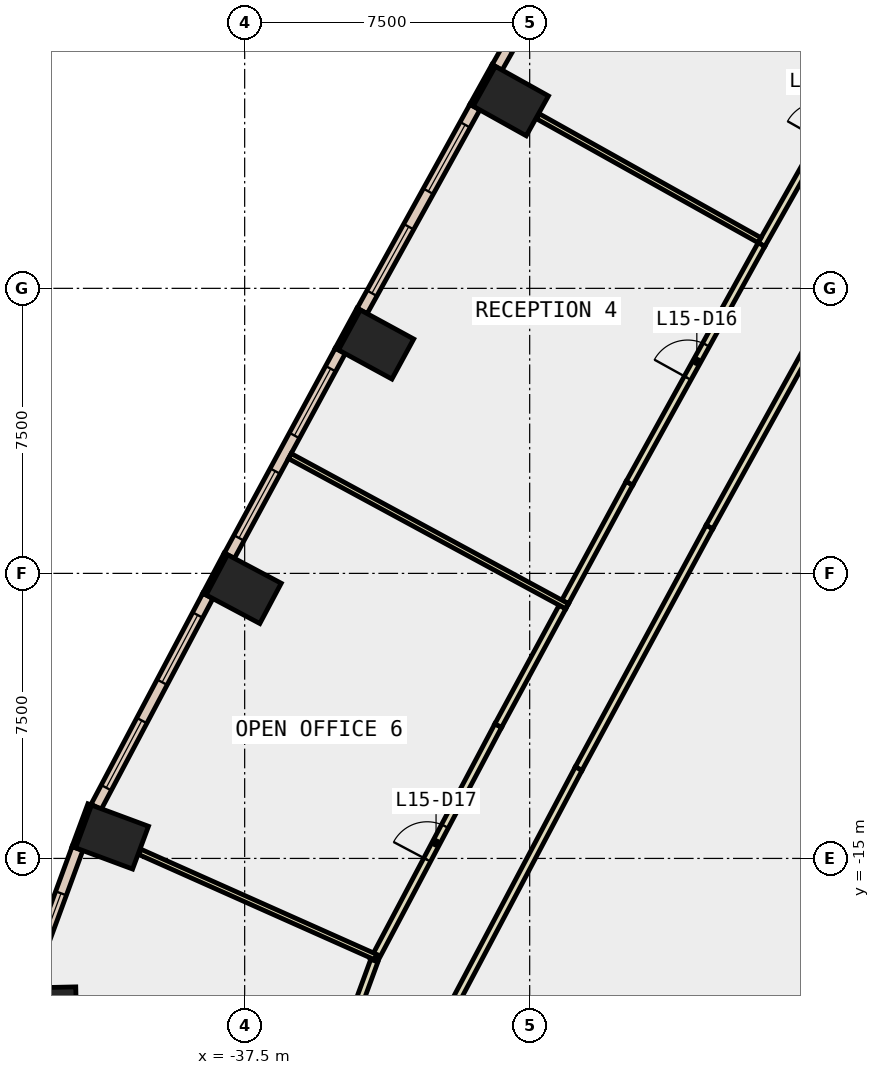
"""IFC4 building model, lengths in metres.
Left out: names, types, materials, properties, quantities, classifications, styles, units other than length and angle.
Written with IfcOpenShell. Run it as: python <this file> out.ifc"""

import sys

from ifc_helpers import new_model, si_unit, direction, frame, frame_2d, origin, origin_2d, place, context, subcontext, project, spatial, rectangle, extrude, element, fill, save


model = new_model("IFC4")
c1 = context("Model", 3, precision=1e-05, world=origin(), true_north=direction((0.0, 1.0)))
c2 = subcontext(c1, "Body", "Model", "MODEL_VIEW")
j1 = project(units=[si_unit("LENGTHUNIT", "METRE"), si_unit("PLANEANGLEUNIT", "RADIAN")], contexts=[c1])
p1 = place(None, origin())
s1 = spatial("IfcSite", under=j1, at=p1, CompositionType="ELEMENT")
p2 = place(p1, origin())
s2 = spatial("IfcBuilding", under=s1, at=p2, CompositionType="ELEMENT")
p3 = place(p2, frame((0.0, 0.0, 72.8)))
s3 = spatial("IfcBuildingStorey", under=s2, at=p3, CompositionType="ELEMENT", Elevation=72.8)
for number, where, z_axis, x_axis in (
    (1, (-30.497, 4.928, -0.4), (0.0, 0.0, 1.0), (0.487, 0.873, 0.0)),
    (2, (-34.041, -1.477, -0.4), (0.0, 0.0, 1.0), (0.478, 0.878, 0.0)),
    (3, (-37.526, -7.914, -0.4), (0.0, 0.0, 1.0), (0.469, 0.883, 0.0)),
    (4, (-40.99, -14.438, -0.4), (0.0, 0.0, 1.0), (0.348, 0.937, 0.0)),
    (5, (-42.731, -18.998, -0.4), (0.0, 0.0, 1.0), (-0.023, 1.0, 0.0)),
):
    element("IfcColumn", number, at=place(p3, frame(where, z_axis=z_axis, x_axis=x_axis)), inside=s3, PredefinedType="COLUMN", context=c2, shape_type="SweptSolid", body=[
        extrude(rectangle(XDim=1.2, YDim=1.6, at=origin_2d()), origin(), (0.0, 0.0, 1.0), 4.2),
    ])
p4 = place(p3, frame((-30.947, 5.866, 0.0), z_axis=(0.0, 0.0, 1.0), x_axis=(-0.486817526853, -0.873503689488, 0.0)))
e6 = element("IfcWall", 6, at=p4, inside=s3, PredefinedType="STANDARD", context=c2, shape_type="SweptSolid", body=[
    extrude(rectangle(XDim=1.2, YDim=0.1, at=frame_2d((0.6, 0.0))), origin(), (0.0, 0.0, 1.0), 3.8),
])
p5 = place(p3, frame((-34.5, -0.544, 0.0), z_axis=(0.0, 0.0, 1.0), x_axis=(-0.478267644701, -0.878214131082, 0.0)))
e7 = element("IfcWall", 7, at=p5, inside=s3, PredefinedType="STANDARD", context=c2, shape_type="SweptSolid", body=[
    extrude(rectangle(XDim=1.2, YDim=0.1, at=frame_2d((0.6, 0.0))), origin(), (0.0, 0.0, 1.0), 3.8),
])
p6 = place(p3, frame((-37.995, -6.986, 0.0), z_axis=(0.0, 0.0, 1.0), x_axis=(-0.469467784567, -0.882949601763, 0.0)))
e8 = element("IfcWall", 8, at=p6, inside=s3, PredefinedType="STANDARD", context=c2, shape_type="SweptSolid", body=[
    extrude(rectangle(XDim=1.199, YDim=0.1, at=frame_2d((0.6, 0.0))), origin(), (0.0, 0.0, 1.0), 3.8),
])
p7 = place(p3, frame((-41.578, -13.58, 0.0), z_axis=(0.0, 0.0, 1.0), x_axis=(-0.348446984414, -0.937328490473, 0.0)))
e9 = element("IfcWall", 9, at=p7, inside=s3, PredefinedType="STANDARD", context=c2, shape_type="SweptSolid", body=[
    extrude(rectangle(XDim=1.2, YDim=0.1, at=frame_2d((0.6, 0.0))), origin(), (0.0, 0.0, 1.0), 3.8),
])
p8 = place(p3, frame((-27.84, 11.151, 0.0), z_axis=(0.0, 0.0, 1.0), x_axis=(-0.492097935349, -0.870539845168, 0.0)))
e10 = element("IfcWall", 10, at=p8, inside=s3, PredefinedType="STANDARD", context=c2, shape_type="SweptSolid", body=[
    extrude(rectangle(XDim=6.131, YDim=0.3, at=frame_2d((3.065, 0.0))), origin(), (0.0, 0.0, 1.0), 3.8),
])
p9 = place(p8, frame((0.533, 0.0, 0.9)))
e11 = element("IfcOpeningElement", 11, at=p9, cuts=e10, PredefinedType="OPENING", context=c2, shape_type="SweptSolid", body=[
    extrude(rectangle(XDim=2.0, YDim=2.6, at=frame_2d((1.0, 1.3))), frame((0.0, 0.16, 0.0), z_axis=(0.0, -1.0, 0.0), x_axis=(1.0, 0.0, 0.0)), (0.0, 0.0, 1.0), 0.32),
])
p10 = place(p8, frame((3.598, 0.0, 0.9)))
e12 = element("IfcOpeningElement", 12, at=p10, cuts=e10, PredefinedType="OPENING", context=c2, shape_type="SweptSolid", body=[
    extrude(rectangle(XDim=2.0, YDim=2.6, at=frame_2d((1.0, 1.3))), frame((0.0, 0.16, 0.0), z_axis=(0.0, -1.0, 0.0), x_axis=(1.0, 0.0, 0.0)), (0.0, 0.0, 1.0), 0.32),
])
p11 = place(p3, frame((-31.442, 4.769, 0.0), z_axis=(0.0, 0.0, 1.0), x_axis=(-0.484025698618, -0.875053782963, 0.0)))
e13 = element("IfcWall", 13, at=p11, inside=s3, PredefinedType="STANDARD", context=c2, shape_type="SweptSolid", body=[
    extrude(rectangle(XDim=6.13, YDim=0.3, at=frame_2d((3.065, 0.0))), origin(), (0.0, 0.0, 1.0), 3.8),
])
p12 = place(p11, frame((0.532, 0.0, 0.9)))
e14 = element("IfcOpeningElement", 14, at=p12, cuts=e13, PredefinedType="OPENING", context=c2, shape_type="SweptSolid", body=[
    extrude(rectangle(XDim=2.0, YDim=2.6, at=frame_2d((1.0, 1.3))), frame((0.0, 0.16, 0.0), z_axis=(0.0, -1.0, 0.0), x_axis=(1.0, 0.0, 0.0)), (0.0, 0.0, 1.0), 0.32),
])
p13 = place(p11, frame((3.597, 0.0, 0.9)))
e15 = element("IfcOpeningElement", 15, at=p13, cuts=e13, PredefinedType="OPENING", context=c2, shape_type="SweptSolid", body=[
    extrude(rectangle(XDim=2.0, YDim=2.6, at=frame_2d((1.0, 1.3))), frame((0.0, 0.16, 0.0), z_axis=(0.0, -1.0, 0.0), x_axis=(1.0, 0.0, 0.0)), (0.0, 0.0, 1.0), 0.32),
])
p14 = place(p3, frame((-34.984, -1.645, 0.0), z_axis=(0.0, 0.0, 1.0), x_axis=(-0.476174096946, -0.879351027404, 0.0)))
e16 = element("IfcWall", 16, at=p14, inside=s3, PredefinedType="STANDARD", context=c2, shape_type="SweptSolid", body=[
    extrude(rectangle(XDim=6.131, YDim=0.3, at=frame_2d((3.065, 0.0))), origin(), (0.0, 0.0, 1.0), 3.8),
])
p15 = place(p14, frame((0.533, 0.0, 0.9)))
e17 = element("IfcOpeningElement", 17, at=p15, cuts=e16, PredefinedType="OPENING", context=c2, shape_type="SweptSolid", body=[
    extrude(rectangle(XDim=2.0, YDim=2.6, at=frame_2d((1.0, 1.3))), frame((0.0, 0.16, 0.0), z_axis=(0.0, -1.0, 0.0), x_axis=(1.0, 0.0, 0.0)), (0.0, 0.0, 1.0), 0.32),
])
p16 = place(p14, frame((3.598, 0.0, 0.9)))
e18 = element("IfcOpeningElement", 18, at=p16, cuts=e16, PredefinedType="OPENING", context=c2, shape_type="SweptSolid", body=[
    extrude(rectangle(XDim=2.0, YDim=2.6, at=frame_2d((1.0, 1.3))), frame((0.0, 0.16, 0.0), z_axis=(0.0, -1.0, 0.0), x_axis=(1.0, 0.0, 0.0)), (0.0, 0.0, 1.0), 0.32),
])
p17 = place(p3, frame((-38.469, -8.092, 0.0), z_axis=(0.0, 0.0, 1.0), x_axis=(-0.467968066899, -0.883745375299, 0.0)))
e19 = element("IfcWall", 19, at=p17, inside=s3, PredefinedType="STANDARD", context=c2, shape_type="SweptSolid", body=[
    extrude(rectangle(XDim=6.282, YDim=0.3, at=frame_2d((3.141, 0.0))), origin(), (0.0, 0.0, 1.0), 3.8),
])
p18 = place(p17, frame((0.571, 0.0, 0.9)))
e20 = element("IfcOpeningElement", 20, at=p18, cuts=e19, PredefinedType="OPENING", context=c2, shape_type="SweptSolid", body=[
    extrude(rectangle(XDim=2.0, YDim=2.6, at=frame_2d((1.0, 1.3))), frame((0.0, 0.16, 0.0), z_axis=(0.0, -1.0, 0.0), x_axis=(1.0, 0.0, 0.0)), (0.0, 0.0, 1.0), 0.32),
])
p19 = place(p17, frame((3.712, 0.0, 0.9)))
e21 = element("IfcOpeningElement", 21, at=p19, cuts=e19, PredefinedType="OPENING", context=c2, shape_type="SweptSolid", body=[
    extrude(rectangle(XDim=2.0, YDim=2.6, at=frame_2d((1.0, 1.3))), frame((0.0, 0.16, 0.0), z_axis=(0.0, -1.0, 0.0), x_axis=(1.0, 0.0, 0.0)), (0.0, 0.0, 1.0), 0.32),
])
p20 = place(p3, frame((-41.9, -14.74, 0.0), z_axis=(0.0, 0.0, 1.0), x_axis=(-0.344819708397, -0.938668934556, 0.0)))
e22 = element("IfcWall", 22, at=p20, inside=s3, PredefinedType="STANDARD", context=c2, shape_type="SweptSolid", body=[
    extrude(rectangle(XDim=3.91, YDim=0.3, at=frame_2d((1.955, 0.0))), origin(), (0.0, 0.0, 1.0), 3.8),
])
p21 = place(p20, frame((1.255, 0.0, 0.9)))
e23 = element("IfcOpeningElement", 23, at=p21, cuts=e22, PredefinedType="OPENING", context=c2, shape_type="SweptSolid", body=[
    extrude(rectangle(XDim=1.4, YDim=2.6, at=frame_2d((0.7, 1.3))), frame((0.0, 0.16, 0.0), z_axis=(0.0, -1.0, 0.0), x_axis=(1.0, 0.0, 0.0)), (0.0, 0.0, 1.0), 0.32),
])
p22 = place(p3, frame((-21.77, 0.046, 0.0), z_axis=(0.0, 0.0, 1.0), x_axis=(-0.484062485326, -0.875033433818, 0.0)))
e24 = element("IfcWall", 24, at=p22, inside=s3, PredefinedType="PARTITIONING", context=c2, shape_type="SweptSolid", body=[
    extrude(rectangle(XDim=7.23, YDim=0.2, at=frame_2d((3.615, 0.0))), origin(), (0.0, 0.0, 1.0), 3.8),
])
p23 = place(p3, frame((-25.27, -6.281, 0.0), z_axis=(0.0, 0.0, 1.0), x_axis=(-0.476128647722, -0.879375636926, 0.0)))
e25 = element("IfcWall", 25, at=p23, inside=s3, PredefinedType="PARTITIONING", context=c2, shape_type="SweptSolid", body=[
    extrude(rectangle(XDim=7.229, YDim=0.2, at=frame_2d((3.615, 0.0))), origin(), (0.0, 0.0, 1.0), 3.8),
])
p24 = place(p3, frame((-28.712, -12.638, 0.0), z_axis=(0.0, 0.0, 1.0), x_axis=(-0.46804565502, -0.883704285843, 0.0)))
e26 = element("IfcWall", 26, at=p24, inside=s3, PredefinedType="PARTITIONING", context=c2, shape_type="SweptSolid", body=[
    extrude(rectangle(XDim=6.818, YDim=0.2, at=frame_2d((3.409, 0.0))), origin(), (0.0, 0.0, 1.0), 3.8),
])
p25 = place(p3, frame((-23.901, 1.152, 0.0), z_axis=(0.0, 0.0, 1.0), x_axis=(0.492063845089, 0.870559114797, 0.0)))
e27 = element("IfcWall", 27, at=p25, inside=s3, PredefinedType="PARTITIONING", context=c2, shape_type="SweptSolid", body=[
    extrude(rectangle(XDim=7.326, YDim=0.2, at=frame_2d((3.663, 0.0))), origin(), (0.0, 0.0, 1.0), 3.8),
])
p26 = place(p25, frame((3.163, 0.0, 0.0)))
e28 = element("IfcOpeningElement", 28, at=p26, cuts=e27, PredefinedType="OPENING", context=c2, shape_type="SweptSolid", body=[
    extrude(rectangle(XDim=1.0, YDim=2.1, at=frame_2d((0.5, 1.05))), frame((0.0, 0.11, 0.0), z_axis=(0.0, -1.0, 0.0), x_axis=(1.0, 0.0, 0.0)), (0.0, 0.0, 1.0), 0.22),
])
p27 = place(p3, frame((-29.066, -8.251, 0.0), z_axis=(0.0, 0.0, 1.0), x_axis=(0.476123690619, 0.879378320878, 0.0)))
e29 = element("IfcWall", 29, at=p27, inside=s3, PredefinedType="PARTITIONING", context=c2, shape_type="SweptSolid", body=[
    extrude(rectangle(XDim=3.552, YDim=0.2, at=frame_2d((1.776, 0.0))), origin(), (0.0, 0.0, 1.0), 3.8),
])
p28 = place(p3, frame((-27.375, -5.128, 0.0), z_axis=(0.0, 0.0, 1.0), x_axis=(0.484068035355, 0.875030363558, 0.0)))
e30 = element("IfcWall", 30, at=p28, inside=s3, PredefinedType="PARTITIONING", context=c2, shape_type="SweptSolid", body=[
    extrude(rectangle(XDim=7.177, YDim=0.2, at=frame_2d((3.588, 0.0))), origin(), (0.0, 0.0, 1.0), 3.8),
])
p29 = place(p28, frame((3.163, 0.0, 0.0)))
e31 = element("IfcOpeningElement", 31, at=p29, cuts=e30, PredefinedType="OPENING", context=c2, shape_type="SweptSolid", body=[
    extrude(rectangle(XDim=1.0, YDim=2.1, at=frame_2d((0.5, 1.05))), frame((0.0, 0.11, 0.0), z_axis=(0.0, -1.0, 0.0), x_axis=(1.0, 0.0, 0.0)), (0.0, 0.0, 1.0), 0.22),
])
p30 = place(p3, frame((-34.1, -17.683, 0.0), z_axis=(0.0, 0.0, 1.0), x_axis=(0.468043346631, 0.883705508456, 0.0)))
e32 = element("IfcWall", 32, at=p30, inside=s3, PredefinedType="PARTITIONING", context=c2, shape_type="SweptSolid", body=[
    extrude(rectangle(XDim=6.991, YDim=0.2, at=frame_2d((3.496, 0.0))), origin(), (0.0, 0.0, 1.0), 3.8),
])
p31 = place(p30, frame((2.996, 0.0, 0.0)))
e33 = element("IfcOpeningElement", 33, at=p31, cuts=e32, PredefinedType="OPENING", context=c2, shape_type="SweptSolid", body=[
    extrude(rectangle(XDim=1.0, YDim=2.1, at=frame_2d((0.5, 1.05))), frame((0.0, 0.11, 0.0), z_axis=(0.0, -1.0, 0.0), x_axis=(1.0, 0.0, 0.0)), (0.0, 0.0, 1.0), 0.22),
])
p32 = place(p3, frame((-30.828, -11.505, 0.0), z_axis=(0.0, 0.0, 1.0), x_axis=(0.476267641688, 0.879300365905, 0.0)))
e34 = element("IfcWall", 34, at=p32, inside=s3, PredefinedType="PARTITIONING", context=c2, shape_type="SweptSolid", body=[
    extrude(rectangle(XDim=3.55, YDim=0.2, at=frame_2d((1.775, 0.0))), origin(), (0.0, 0.0, 1.0), 3.8),
])
p33 = place(p3, frame((-34.835, -19.724, 0.0), z_axis=(0.0, 0.0, 1.0), x_axis=(0.34459875492, 0.938750072228, 0.0)))
e35 = element("IfcWall", 35, at=p33, inside=s3, PredefinedType="PARTITIONING", context=c2, shape_type="SweptSolid", body=[
    extrude(rectangle(XDim=2.168, YDim=0.2, at=frame_2d((1.084, 0.0))), origin(), (0.0, 0.0, 1.0), 3.8),
])
p34 = place(p3, frame((-23.951, 1.266, 0.0), z_axis=(0.0, 0.0, 1.0), x_axis=(-0.872786908026, 0.488101437385, 0.0)))
e36 = element("IfcWall", 36, at=p34, inside=s3, PredefinedType="PARTITIONING", context=c2, shape_type="SweptSolid", body=[
    extrude(rectangle(XDim=6.681, YDim=0.15, at=frame_2d((3.34, 0.0))), origin(), (0.0, 0.0, 1.0), 3.8),
])
p35 = place(p3, frame((-29.014, -8.365, 0.0), z_axis=(0.0, 0.0, 1.0), x_axis=(-0.879354069803, 0.476168478504, 0.0)))
e37 = element("IfcWall", 37, at=p35, inside=s3, PredefinedType="PARTITIONING", context=c2, shape_type="SweptSolid", body=[
    extrude(rectangle(XDim=8.299, YDim=0.15, at=frame_2d((4.15, 0.0))), origin(), (0.0, 0.0, 1.0), 3.8),
])
p36 = place(p3, frame((-34.053, -17.595, 0.0), z_axis=(0.0, 0.0, 1.0), x_axis=(-0.913298274621, 0.40729137184, 0.0)))
e38 = element("IfcWall", 38, at=p36, inside=s3, PredefinedType="PARTITIONING", context=c2, shape_type="SweptSolid", body=[
    extrude(rectangle(XDim=6.796, YDim=0.15, at=frame_2d((3.398, 0.0))), origin(), (0.0, 0.0, 1.0), 3.8),
])
p37 = place(p12, origin())
e39 = element("IfcWindow", 39, at=p37, inside=s3, PartitioningType="SINGLE_PANEL", PredefinedType="WINDOW", context=c2, shape_type="SweptSolid", body=[
    extrude(rectangle(XDim=2.0, YDim=2.6, at=frame_2d((1.0, 1.3))), frame((0.0, 0.03, 0.0), z_axis=(0.0, -1.0, 0.0), x_axis=(1.0, 0.0, 0.0)), (0.0, 0.0, 1.0), 0.06),
])
fill(e14, e39)
p38 = place(p13, origin())
e40 = element("IfcWindow", 40, at=p38, inside=s3, PartitioningType="SINGLE_PANEL", PredefinedType="WINDOW", context=c2, shape_type="SweptSolid", body=[
    extrude(rectangle(XDim=2.0, YDim=2.6, at=frame_2d((1.0, 1.3))), frame((0.0, 0.03, 0.0), z_axis=(0.0, -1.0, 0.0), x_axis=(1.0, 0.0, 0.0)), (0.0, 0.0, 1.0), 0.06),
])
fill(e15, e40)
p39 = place(p15, origin())
e41 = element("IfcWindow", 41, at=p39, inside=s3, PartitioningType="SINGLE_PANEL", PredefinedType="WINDOW", context=c2, shape_type="SweptSolid", body=[
    extrude(rectangle(XDim=2.0, YDim=2.6, at=frame_2d((1.0, 1.3))), frame((0.0, 0.03, 0.0), z_axis=(0.0, -1.0, 0.0), x_axis=(1.0, 0.0, 0.0)), (0.0, 0.0, 1.0), 0.06),
])
fill(e17, e41)
p40 = place(p16, origin())
e42 = element("IfcWindow", 42, at=p40, inside=s3, PartitioningType="SINGLE_PANEL", PredefinedType="WINDOW", context=c2, shape_type="SweptSolid", body=[
    extrude(rectangle(XDim=2.0, YDim=2.6, at=frame_2d((1.0, 1.3))), frame((0.0, 0.03, 0.0), z_axis=(0.0, -1.0, 0.0), x_axis=(1.0, 0.0, 0.0)), (0.0, 0.0, 1.0), 0.06),
])
fill(e18, e42)
p41 = place(p18, origin())
e43 = element("IfcWindow", 43, at=p41, inside=s3, PartitioningType="SINGLE_PANEL", PredefinedType="WINDOW", context=c2, shape_type="SweptSolid", body=[
    extrude(rectangle(XDim=2.0, YDim=2.6, at=frame_2d((1.0, 1.3))), frame((0.0, 0.03, 0.0), z_axis=(0.0, -1.0, 0.0), x_axis=(1.0, 0.0, 0.0)), (0.0, 0.0, 1.0), 0.06),
])
fill(e20, e43)
p42 = place(p19, origin())
e44 = element("IfcWindow", 44, at=p42, inside=s3, PartitioningType="SINGLE_PANEL", PredefinedType="WINDOW", context=c2, shape_type="SweptSolid", body=[
    extrude(rectangle(XDim=2.0, YDim=2.6, at=frame_2d((1.0, 1.3))), frame((0.0, 0.03, 0.0), z_axis=(0.0, -1.0, 0.0), x_axis=(1.0, 0.0, 0.0)), (0.0, 0.0, 1.0), 0.06),
])
fill(e21, e44)
p43 = place(p21, origin())
e45 = element("IfcWindow", 45, at=p43, inside=s3, PartitioningType="SINGLE_PANEL", PredefinedType="WINDOW", context=c2, shape_type="SweptSolid", body=[
    extrude(rectangle(XDim=1.4, YDim=2.6, at=frame_2d((0.7, 1.3))), frame((0.0, 0.03, 0.0), z_axis=(0.0, -1.0, 0.0), x_axis=(1.0, 0.0, 0.0)), (0.0, 0.0, 1.0), 0.06),
])
fill(e23, e45)
p44 = place(p29, origin())
e46 = element("IfcDoor", 46, at=p44, inside=s3, OperationType="SINGLE_SWING_LEFT", PredefinedType="DOOR", context=c2, shape_type="SweptSolid", body=[
    extrude(rectangle(XDim=1.0, YDim=2.1, at=frame_2d((0.5, 1.05))), frame((0.0, 0.025, 0.0), z_axis=(0.0, -1.0, 0.0), x_axis=(1.0, 0.0, 0.0)), (0.0, 0.0, 1.0), 0.05),
])
fill(e31, e46)
p45 = place(p31, origin())
e47 = element("IfcDoor", 47, at=p45, inside=s3, OperationType="SINGLE_SWING_LEFT", PredefinedType="DOOR", context=c2, shape_type="SweptSolid", body=[
    extrude(rectangle(XDim=1.0, YDim=2.1, at=frame_2d((0.5, 1.05))), frame((0.0, 0.025, 0.0), z_axis=(0.0, -1.0, 0.0), x_axis=(1.0, 0.0, 0.0)), (0.0, 0.0, 1.0), 0.05),
])
fill(e33, e47)
save(model, sys.argv[1])
